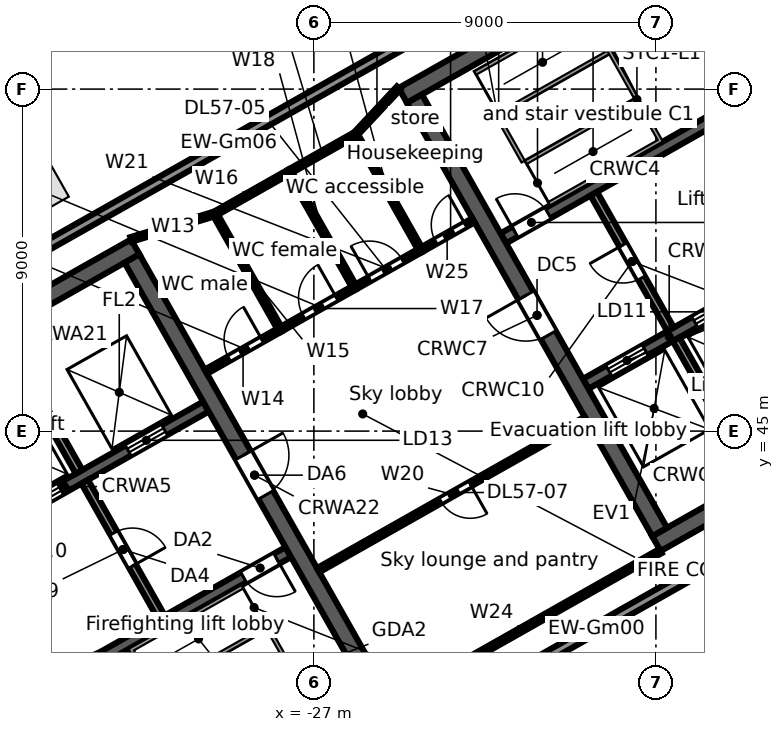
"""IFC4 building model, lengths in metres.
Left out: names, types, materials, properties, quantities, classifications, styles, units other than length and angle.
Written with IfcOpenShell. Run it as: python <this file> out.ifc"""

import sys

from ifc_helpers import new_model, si_unit, direction, frame, frame_2d, origin, origin_2d, place, context, subcontext, project, spatial, rectangle, extrude, element, fill, save


model = new_model("IFC4")
c1 = context("Model", 3, precision=1e-05, world=origin(), true_north=direction((0.0, 1.0)))
c2 = subcontext(c1, "Body", "Model", "MODEL_VIEW")
j1 = project(units=[si_unit("LENGTHUNIT", "METRE"), si_unit("PLANEANGLEUNIT", "RADIAN")], contexts=[c1])
p1 = place(None, origin())
s1 = spatial("IfcSite", under=j1, at=p1, CompositionType="ELEMENT")
p2 = place(p1, origin())
s2 = spatial("IfcBuilding", under=s1, at=p2, CompositionType="ELEMENT")
p3 = place(p2, frame((0.0, 0.0, 258.2)))
s3 = spatial("IfcBuildingStorey", under=s2, at=p3, CompositionType="ELEMENT", Elevation=258.2)
p4 = place(p3, frame((-34.334, 51.414, 0.0), z_axis=(0.0, 0.0, 1.0), x_axis=(-0.87035569594, -0.492423560103, 0.0)))
e1 = element("IfcColumn", 1, at=p4, inside=s3, PredefinedType="COLUMN", context=c2, shape_type="SweptSolid", body=[
    extrude(rectangle(XDim=1.3, YDim=1.3, at=origin_2d()), origin(), (0.0, 0.0, 1.0), 4.5),
])
p5 = place(p3, frame((-0.364, 50.666, 0.0), z_axis=(0.0, 0.0, 1.0), x_axis=(-0.870355021882, -0.492424751494, 0.0)))
e2 = element("IfcWall", 2, at=p5, inside=s3, PredefinedType="STANDARD", context=c2, shape_type="SweptSolid", body=[
    extrude(rectangle(XDim=44.126, YDim=0.25, at=frame_2d((22.063, 0.0))), origin(), (0.0, 0.0, 1.0), 3.12),
])
p6 = place(p3, frame((-56.251, 37.302, 0.0), z_axis=(0.0, 0.0, 1.0), x_axis=(0.87035543516, 0.49242402103, 0.0)))
e3 = element("IfcWall", 3, at=p6, inside=s3, PredefinedType="STANDARD", context=c2, shape_type="SweptSolid", body=[
    extrude(rectangle(XDim=62.067, YDim=0.25, at=frame_2d((31.033, 0.0))), origin(), (0.0, 0.0, 1.0), 3.512),
])
p7 = place(p3, frame((-34.245, 38.097, 0.0), z_axis=(0.0, 0.0, 1.0), x_axis=(0.870360409231, 0.492415229297, 0.0)))
e4 = element("IfcWall", 4, at=p7, inside=s3, PredefinedType="SOLIDWALL", context=c2, shape_type="SweptSolid", body=[
    extrude(rectangle(XDim=7.55, YDim=0.3, at=frame_2d((3.775, 0.0))), origin(), (0.0, 0.0, 1.0), 4.22),
])
p8 = place(p7, frame((6.2, 0.0, 0.0)))
e5 = element("IfcOpeningElement", 5, at=p8, cuts=e4, PredefinedType="OPENING", context=c2, shape_type="SweptSolid", body=[
    extrude(rectangle(XDim=1.0, YDim=2.1, at=frame_2d((0.5, 1.05))), frame((0.0, 0.16, 0.0), z_axis=(0.0, -1.0, 0.0), x_axis=(1.0, 0.0, 0.0)), (0.0, 0.0, 1.0), 0.32),
])
p9 = place(p3, frame((-37.282, 41.435, 0.0), z_axis=(0.0, 0.0, 1.0), x_axis=(0.870352688754, 0.492428875248, 0.0)))
e6 = element("IfcWall", 6, at=p9, inside=s3, PredefinedType="SOLIDWALL", context=c2, shape_type="SweptSolid", body=[
    extrude(rectangle(XDim=8.55, YDim=0.3, at=frame_2d((4.275, 0.0))), origin(), (0.0, 0.0, 1.0), 4.22),
])
p10 = place(p9, frame((0.65, 0.0, 0.0)))
e7 = element("IfcOpeningElement", 7, at=p10, cuts=e6, PredefinedType="OPENING", context=c2, shape_type="SweptSolid", body=[
    extrude(rectangle(XDim=1.1, YDim=2.1, at=frame_2d((0.55, 1.05))), frame((0.0, 0.16, 0.0), z_axis=(0.0, -1.0, 0.0), x_axis=(1.0, 0.0, 0.0)), (0.0, 0.0, 1.0), 0.32),
])
p11 = place(p9, frame((3.05, 0.0, 0.0)))
e8 = element("IfcOpeningElement", 8, at=p11, cuts=e6, PredefinedType="OPENING", context=c2, shape_type="SweptSolid", body=[
    extrude(rectangle(XDim=1.1, YDim=2.1, at=frame_2d((0.55, 1.05))), frame((0.0, 0.16, 0.0), z_axis=(0.0, -1.0, 0.0), x_axis=(1.0, 0.0, 0.0)), (0.0, 0.0, 1.0), 0.32),
])
p12 = place(p9, frame((6.2, 0.0, 0.0)))
e9 = element("IfcOpeningElement", 9, at=p12, cuts=e6, PredefinedType="OPENING", context=c2, shape_type="SweptSolid", body=[
    extrude(rectangle(XDim=1.1, YDim=2.1, at=frame_2d((0.55, 1.05))), frame((0.0, 0.16, 0.0), z_axis=(0.0, -1.0, 0.0), x_axis=(1.0, 0.0, 0.0)), (0.0, 0.0, 1.0), 0.32),
])
p13 = place(p3, frame((-46.498, 41.477, 0.0), z_axis=(0.0, 0.0, 1.0), x_axis=(0.870359753402, 0.492416388494, 0.0)))
e10 = element("IfcWall", 10, at=p13, inside=s3, PredefinedType="SOLIDWALL", context=c2, shape_type="SweptSolid", body=[
    extrude(rectangle(XDim=17.0, YDim=0.45, at=frame_2d((8.5, 0.0))), origin(), (0.0, 0.0, 1.0), 4.22),
])
p14 = place(p3, frame((-33.031, 43.667, 0.0), z_axis=(0.0, 0.0, 1.0), x_axis=(0.492408451753, -0.87036424366, 0.0)))
e11 = element("IfcWall", 11, at=p14, inside=s3, PredefinedType="PARTITIONING", context=c2, shape_type="SweptSolid", body=[
    extrude(rectangle(XDim=4.1, YDim=0.2, at=frame_2d((2.05, 0.0))), origin(), (0.0, 0.0, 1.0), 4.22),
])
p15 = place(p14, frame((1.55, 0.0, 0.0)))
e12 = element("IfcOpeningElement", 12, at=p15, cuts=e11, PredefinedType="OPENING", context=c2, shape_type="SweptSolid", body=[
    extrude(rectangle(XDim=1.0, YDim=2.1, at=frame_2d((0.5, 1.05))), frame((0.0, 0.11, 0.0), z_axis=(0.0, -1.0, 0.0), x_axis=(1.0, 0.0, 0.0)), (0.0, 0.0, 1.0), 0.22),
])
p16 = place(p3, frame((-35.246, 47.584, 0.0), z_axis=(0.0, 0.0, 1.0), x_axis=(0.492409653846, -0.870363563575, 0.0)))
e13 = element("IfcWall", 13, at=p16, inside=s3, PredefinedType="SOLIDWALL", context=c2, shape_type="SweptSolid", body=[
    extrude(rectangle(XDim=4.2, YDim=0.2, at=frame_2d((2.1, 0.0))), origin(), (0.0, 0.0, 1.0), 4.22),
])
p17 = place(p3, frame((-31.787, 49.542, 0.0), z_axis=(0.0, 0.0, 1.0), x_axis=(0.492421378713, -0.870356930107, 0.0)))
e14 = element("IfcWall", 14, at=p17, inside=s3, PredefinedType="SOLIDWALL", context=c2, shape_type="SweptSolid", body=[
    extrude(rectangle(XDim=13.1, YDim=0.45, at=frame_2d((6.55, 0.0))), origin(), (0.0, 0.0, 1.0), 4.22),
])
p18 = place(p17, frame((5.95, 0.0, 0.0)))
e15 = element("IfcOpeningElement", 15, at=p18, cuts=e14, PredefinedType="OPENING", context=c2, shape_type="SweptSolid", body=[
    extrude(rectangle(XDim=1.2, YDim=2.1, at=frame_2d((0.6, 1.05))), frame((0.0, 0.235, 0.0), z_axis=(0.0, -1.0, 0.0), x_axis=(1.0, 0.0, 0.0)), (0.0, 0.0, 1.0), 0.47),
])
p19 = place(p3, frame((-17.988, 42.039, 0.0), z_axis=(0.0, 0.0, 1.0), x_axis=(0.870360574057, 0.492414937962, 0.0)))
e16 = element("IfcWall", 16, at=p19, inside=s3, PredefinedType="SOLIDWALL", context=c2, shape_type="SweptSolid", body=[
    extrude(rectangle(XDim=15.0, YDim=0.45, at=frame_2d((7.5, 0.0))), origin(), (0.0, 0.0, 1.0), 4.22),
])
p20 = place(p19, frame((6.1, 0.0, 0.0)))
e17 = element("IfcOpeningElement", 17, at=p20, cuts=e16, PredefinedType="OPENING", context=c2, shape_type="SweptSolid", body=[
    extrude(rectangle(XDim=1.2, YDim=2.1, at=frame_2d((0.6, 1.05))), frame((0.0, 0.235, 0.0), z_axis=(0.0, -1.0, 0.0), x_axis=(1.0, 0.0, 0.0)), (0.0, 0.0, 1.0), 0.47),
])
p21 = place(p3, frame((-19.849, 46.242, 0.0), z_axis=(0.0, 0.0, 1.0), x_axis=(0.870347559728, 0.492437940532, 0.0)))
e18 = element("IfcWall", 18, at=p21, inside=s3, PredefinedType="SOLIDWALL", context=c2, shape_type="SweptSolid", body=[
    extrude(rectangle(XDim=5.05, YDim=0.3, at=frame_2d((2.525, 0.0))), origin(), (0.0, 0.0, 1.0), 4.22),
])
p22 = place(p21, frame((0.7, 0.0, 0.0)))
e19 = element("IfcOpeningElement", 19, at=p22, cuts=e18, PredefinedType="OPENING", context=c2, shape_type="SweptSolid", body=[
    extrude(rectangle(XDim=1.1, YDim=2.1, at=frame_2d((0.55, 1.05))), frame((0.0, 0.16, 0.0), z_axis=(0.0, -1.0, 0.0), x_axis=(1.0, 0.0, 0.0)), (0.0, 0.0, 1.0), 0.32),
])
p23 = place(p21, frame((3.3, 0.0, 0.0)))
e20 = element("IfcOpeningElement", 20, at=p23, cuts=e18, PredefinedType="OPENING", context=c2, shape_type="SweptSolid", body=[
    extrude(rectangle(XDim=1.1, YDim=2.1, at=frame_2d((0.55, 1.05))), frame((0.0, 0.16, 0.0), z_axis=(0.0, -1.0, 0.0), x_axis=(1.0, 0.0, 0.0)), (0.0, 0.0, 1.0), 0.32),
])
p24 = place(p3, frame((-22.015, 50.072, 0.0), z_axis=(0.0, 0.0, 1.0), x_axis=(0.870354900257, 0.492424966466, 0.0)))
e21 = element("IfcWall", 21, at=p24, inside=s3, PredefinedType="SOLIDWALL", context=c2, shape_type="SweptSolid", body=[
    extrude(rectangle(XDim=7.35, YDim=0.3, at=frame_2d((3.675, 0.0))), origin(), (0.0, 0.0, 1.0), 4.22),
])
p25 = place(p24, frame((0.35, 0.0, 0.0)))
e22 = element("IfcOpeningElement", 22, at=p25, cuts=e21, PredefinedType="OPENING", context=c2, shape_type="SweptSolid", body=[
    extrude(rectangle(XDim=1.0, YDim=2.1, at=frame_2d((0.5, 1.05))), frame((0.0, 0.16, 0.0), z_axis=(0.0, -1.0, 0.0), x_axis=(1.0, 0.0, 0.0)), (0.0, 0.0, 1.0), 0.32),
])
p26 = place(p3, frame((-24.66, 53.832, 0.0), z_axis=(0.0, 0.0, 1.0), x_axis=(0.870353598469, 0.492427267353, 0.0)))
e23 = element("IfcWall", 23, at=p26, inside=s3, PredefinedType="SOLIDWALL", context=c2, shape_type="SweptSolid", body=[
    extrude(rectangle(XDim=15.0, YDim=0.45, at=frame_2d((7.5, 0.0))), origin(), (0.0, 0.0, 1.0), 4.22),
])
p27 = place(p3, frame((-24.353, 53.747, 0.0), z_axis=(0.0, 0.0, 1.0), x_axis=(0.492435496286, -0.870348942665, 0.0)))
e24 = element("IfcWall", 24, at=p27, inside=s3, PredefinedType="SOLIDWALL", context=c2, shape_type="SweptSolid", body=[
    extrude(rectangle(XDim=13.1, YDim=0.45, at=frame_2d((6.55, 0.0))), origin(), (0.0, 0.0, 1.0), 4.22),
])
p28 = place(p27, frame((5.95, 0.0, 0.0)))
e25 = element("IfcOpeningElement", 25, at=p28, cuts=e24, PredefinedType="OPENING", context=c2, shape_type="SweptSolid", body=[
    extrude(rectangle(XDim=1.2, YDim=2.1, at=frame_2d((0.6, 1.05))), frame((0.0, 0.235, 0.0), z_axis=(0.0, -1.0, 0.0), x_axis=(1.0, 0.0, 0.0)), (0.0, 0.0, 1.0), 0.47),
])
p29 = place(p3, frame((-17.469, 47.417, 0.0), z_axis=(0.0, 0.0, 1.0), x_axis=(0.492453686477, -0.870338650569, 0.0)))
e26 = element("IfcWall", 26, at=p29, inside=s3, PredefinedType="SOLIDWALL", context=c2, shape_type="SweptSolid", body=[
    extrude(rectangle(XDim=4.2, YDim=0.2, at=frame_2d((2.1, 0.0))), origin(), (0.0, 0.0, 1.0), 4.22),
])
p30 = place(p3, frame((-19.635, 51.246, 0.0), z_axis=(0.0, 0.0, 1.0), x_axis=(0.492408451753, -0.87036424366, 0.0)))
e27 = element("IfcWall", 27, at=p30, inside=s3, PredefinedType="PARTITIONING", context=c2, shape_type="SweptSolid", body=[
    extrude(rectangle(XDim=4.1, YDim=0.2, at=frame_2d((2.05, 0.0))), origin(), (0.0, 0.0, 1.0), 4.22),
])
p31 = place(p30, frame((1.55, 0.0, 0.0)))
e28 = element("IfcOpeningElement", 28, at=p31, cuts=e27, PredefinedType="OPENING", context=c2, shape_type="SweptSolid", body=[
    extrude(rectangle(XDim=1.0, YDim=2.1, at=frame_2d((0.5, 1.05))), frame((0.0, 0.11, 0.0), z_axis=(0.0, -1.0, 0.0), x_axis=(1.0, 0.0, 0.0)), (0.0, 0.0, 1.0), 0.22),
])
p32 = place(p3, frame((-17.76, 57.477, 0.0), z_axis=(0.0, 0.0, 1.0), x_axis=(0.49243456751, -0.870349468157, 0.0)))
e29 = element("IfcWall", 29, at=p32, inside=s3, PredefinedType="SOLIDWALL", context=c2, shape_type="SweptSolid", body=[
    extrude(rectangle(XDim=4.2, YDim=0.3, at=frame_2d((2.1, 0.0))), origin(), (0.0, 0.0, 1.0), 4.22),
])
p33 = place(p3, frame((-31.812, 50.044, 0.0), z_axis=(0.0, 0.0, 1.0), x_axis=(0.956397612161, 0.292067813107, 0.0)))
e30 = element("IfcWall", 30, at=p33, inside=s3, PredefinedType="PARTITIONING", context=c2, shape_type="SweptSolid", body=[
    extrude(rectangle(XDim=2.305, YDim=0.125, at=frame_2d((1.152, 0.0))), origin(), (0.0, 0.0, 1.0), 4.22),
])
p34 = place(p3, frame((-29.843, 46.563, 0.0), z_axis=(0.0, 0.0, 1.0), x_axis=(0.870437546499, 0.492278861667, 0.0)))
e31 = element("IfcWall", 31, at=p34, inside=s3, PredefinedType="PARTITIONING", context=c2, shape_type="SweptSolid", body=[
    extrude(rectangle(XDim=2.25, YDim=0.125, at=frame_2d((1.125, 0.0))), origin(), (0.0, 0.0, 1.0), 4.22),
])
p35 = place(p34, frame((0.7, 0.0, 0.0)))
e32 = element("IfcOpeningElement", 32, at=p35, cuts=e31, PredefinedType="OPENING", context=c2, shape_type="SweptSolid", body=[
    extrude(rectangle(XDim=1.0, YDim=2.1, at=frame_2d((0.5, 1.05))), frame((0.0, 0.073, 0.0), z_axis=(0.0, -1.0, 0.0), x_axis=(1.0, 0.0, 0.0)), (0.0, 0.0, 1.0), 0.145),
])
p36 = place(p3, frame((-29.608, 50.717, 0.0), z_axis=(0.0, 0.0, 1.0), x_axis=(0.492521469645, -0.870300294116, 0.0)))
e33 = element("IfcWall", 33, at=p36, inside=s3, PredefinedType="PARTITIONING", context=c2, shape_type="SweptSolid", body=[
    extrude(rectangle(XDim=3.5, YDim=0.125, at=frame_2d((1.75, 0.0))), origin(), (0.0, 0.0, 1.0), 4.22),
])
p37 = place(p3, frame((-29.608, 50.717, 0.0), z_axis=(0.0, 0.0, 1.0), x_axis=(0.870332332106, 0.492464853254, 0.0)))
e34 = element("IfcWall", 34, at=p37, inside=s3, PredefinedType="PARTITIONING", context=c2, shape_type="SweptSolid", body=[
    extrude(rectangle(XDim=2.25, YDim=0.125, at=frame_2d((1.125, 0.0))), origin(), (0.0, 0.0, 1.0), 4.22),
])
p38 = place(p3, frame((-27.884, 47.671, 0.0), z_axis=(0.0, 0.0, 1.0), x_axis=(0.870285818058, 0.4925470484, 0.0)))
e35 = element("IfcWall", 35, at=p38, inside=s3, PredefinedType="PARTITIONING", context=c2, shape_type="SweptSolid", body=[
    extrude(rectangle(XDim=2.25, YDim=0.125, at=frame_2d((1.125, 0.0))), origin(), (0.0, 0.0, 1.0), 4.22),
])
p39 = place(p38, frame((0.7, 0.0, 0.0)))
e36 = element("IfcOpeningElement", 36, at=p39, cuts=e35, PredefinedType="OPENING", context=c2, shape_type="SweptSolid", body=[
    extrude(rectangle(XDim=1.0, YDim=2.1, at=frame_2d((0.5, 1.05))), frame((0.0, 0.073, 0.0), z_axis=(0.0, -1.0, 0.0), x_axis=(1.0, 0.0, 0.0)), (0.0, 0.0, 1.0), 0.145),
])
p40 = place(p3, frame((-27.65, 51.825, 0.0), z_axis=(0.0, 0.0, 1.0), x_axis=(0.492551369934, -0.870283372228, 0.0)))
e37 = element("IfcWall", 37, at=p40, inside=s3, PredefinedType="PARTITIONING", context=c2, shape_type="SweptSolid", body=[
    extrude(rectangle(XDim=3.5, YDim=0.125, at=frame_2d((1.75, 0.0))), origin(), (0.0, 0.0, 1.0), 4.22),
])
p41 = place(p3, frame((-27.65, 51.825, 0.0), z_axis=(0.0, 0.0, 1.0), x_axis=(0.870330884088, 0.492467412326, 0.0)))
e38 = element("IfcWall", 38, at=p41, inside=s3, PredefinedType="PARTITIONING", context=c2, shape_type="SweptSolid", body=[
    extrude(rectangle(XDim=2.0, YDim=0.125, at=frame_2d((1.0, 0.0))), origin(), (0.0, 0.0, 1.0), 4.22),
])
p42 = place(p3, frame((-26.888, 41.34, 0.0), z_axis=(0.0, 0.0, 1.0), x_axis=(0.870318838095, 0.492488700436, 0.0)))
e39 = element("IfcWall", 39, at=p42, inside=s3, PredefinedType="PARTITIONING", context=c2, shape_type="SweptSolid", body=[
    extrude(rectangle(XDim=8.091, YDim=0.125, at=frame_2d((4.046, 0.0))), origin(), (0.0, 0.0, 1.0), 3.492),
])
p43 = place(p42, frame((3.7, 0.0, 0.0)))
e40 = element("IfcOpeningElement", 40, at=p43, cuts=e39, PredefinedType="OPENING", context=c2, shape_type="SweptSolid", body=[
    extrude(rectangle(XDim=0.9, YDim=2.1, at=frame_2d((0.45, 1.05))), frame((0.0, 0.073, 0.0), z_axis=(0.0, -1.0, 0.0), x_axis=(1.0, 0.0, 0.0)), (0.0, 0.0, 1.0), 0.145),
])
p44 = place(p3, frame((-25.926, 48.779, 0.0), z_axis=(0.0, 0.0, 1.0), x_axis=(0.870474108635, 0.492214207633, 0.0)))
e41 = element("IfcWall", 41, at=p44, inside=s3, PredefinedType="PARTITIONING", context=c2, shape_type="SweptSolid", body=[
    extrude(rectangle(XDim=1.999, YDim=0.125, at=frame_2d((1.0, 0.0))), origin(), (0.0, 0.0, 1.0), 4.22),
])
p45 = place(p44, frame((0.45, 0.0, 0.0)))
e42 = element("IfcOpeningElement", 42, at=p45, cuts=e41, PredefinedType="OPENING", context=c2, shape_type="SweptSolid", body=[
    extrude(rectangle(XDim=1.0, YDim=2.1, at=frame_2d((0.5, 1.05))), frame((0.0, 0.073, 0.0), z_axis=(0.0, -1.0, 0.0), x_axis=(1.0, 0.0, 0.0)), (0.0, 0.0, 1.0), 0.145),
])
p46 = place(p3, frame((-25.909, 52.81, 0.0), z_axis=(0.0, 0.0, 1.0), x_axis=(0.682678244456, 0.730719107829, 0.0)))
e43 = element("IfcWall", 43, at=p46, inside=s3, PredefinedType="PARTITIONING", context=c2, shape_type="SweptSolid", body=[
    extrude(rectangle(XDim=1.667, YDim=0.125, at=frame_2d((0.833, 0.0))), origin(), (0.0, 0.0, 1.0), 3.492),
])
p47 = place(p3, frame((-25.909, 52.81, 0.0), z_axis=(0.0, 0.0, 1.0), x_axis=(0.492190545807, -0.870487487916, 0.0)))
e44 = element("IfcWall", 44, at=p47, inside=s3, PredefinedType="PARTITIONING", context=c2, shape_type="SweptSolid", body=[
    extrude(rectangle(XDim=3.5, YDim=0.125, at=frame_2d((1.75, 0.0))), origin(), (0.0, 0.0, 1.0), 4.22),
])
p48 = place(p3, frame((-24.919, 37.859, 0.0), z_axis=(0.0, 0.0, 1.0), x_axis=(0.870357635969, 0.492420131098, 0.0)))
e45 = element("IfcWall", 45, at=p48, inside=s3, PredefinedType="PARTITIONING", context=c2, shape_type="SweptSolid", body=[
    extrude(rectangle(XDim=8.091, YDim=0.125, at=frame_2d((4.045, 0.0))), origin(), (0.0, 0.0, 1.0), 3.492),
])
p49 = place(p3, frame((-24.186, 49.763, 0.0), z_axis=(0.0, 0.0, 1.0), x_axis=(0.870199776528, 0.492699044986, 0.0)))
e46 = element("IfcWall", 46, at=p49, inside=s3, PredefinedType="PARTITIONING", context=c2, shape_type="SweptSolid", body=[
    extrude(rectangle(XDim=1.592, YDim=0.125, at=frame_2d((0.796, 0.0))), origin(), (0.0, 0.0, 1.0), 3.492),
])
p50 = place(p49, frame((0.45, 0.0, 0.0)))
e47 = element("IfcOpeningElement", 47, at=p50, cuts=e46, PredefinedType="OPENING", context=c2, shape_type="SweptSolid", body=[
    extrude(rectangle(XDim=0.9, YDim=2.1, at=frame_2d((0.45, 1.05))), frame((0.0, 0.073, 0.0), z_axis=(0.0, -1.0, 0.0), x_axis=(1.0, 0.0, 0.0)), (0.0, 0.0, 1.0), 0.145),
])
p51 = place(p11, origin())
e48 = element("IfcDoor", 48, at=p51, inside=s3, OperationType="DOUBLE_DOOR_SLIDING", PredefinedType="DOOR", context=c2, shape_type="SweptSolid", body=[
    extrude(rectangle(XDim=1.1, YDim=2.1, at=frame_2d((0.55, 1.05))), frame((0.0, 0.025, 0.0), z_axis=(0.0, -1.0, 0.0), x_axis=(1.0, 0.0, 0.0)), (0.0, 0.0, 1.0), 0.05),
])
fill(e8, e48)
p52 = place(p12, origin())
e49 = element("IfcDoor", 49, at=p52, inside=s3, OperationType="DOUBLE_DOOR_SLIDING", PredefinedType="DOOR", context=c2, shape_type="SweptSolid", body=[
    extrude(rectangle(XDim=1.1, YDim=2.1, at=frame_2d((0.55, 1.05))), frame((0.0, 0.025, 0.0), z_axis=(0.0, -1.0, 0.0), x_axis=(1.0, 0.0, 0.0)), (0.0, 0.0, 1.0), 0.05),
])
fill(e9, e49)
p53 = place(p8, frame((1.0, 0.0, 0.0), z_axis=(0.0, 0.0, 1.0), x_axis=(-1.0, 0.0, 0.0)))
e50 = element("IfcDoor", 50, at=p53, inside=s3, OperationType="SINGLE_SWING_LEFT", PredefinedType="DOOR", context=c2, shape_type="SweptSolid", body=[
    extrude(rectangle(XDim=1.0, YDim=2.1, at=frame_2d((0.5, 1.05))), frame((0.0, 0.025, 0.0), z_axis=(0.0, -1.0, 0.0), x_axis=(1.0, 0.0, 0.0)), (0.0, 0.0, 1.0), 0.05),
])
fill(e5, e50)
p54 = place(p15, origin())
e51 = element("IfcDoor", 51, at=p54, inside=s3, OperationType="SINGLE_SWING_RIGHT", PredefinedType="DOOR", context=c2, shape_type="SweptSolid", body=[
    extrude(rectangle(XDim=1.0, YDim=2.1, at=frame_2d((0.5, 1.05))), frame((0.0, 0.025, 0.0), z_axis=(0.0, -1.0, 0.0), x_axis=(1.0, 0.0, 0.0)), (0.0, 0.0, 1.0), 0.05),
])
fill(e12, e51)
p55 = place(p18, origin())
e52 = element("IfcDoor", 52, at=p55, inside=s3, OperationType="SINGLE_SWING_LEFT", PredefinedType="DOOR", context=c2, shape_type="SweptSolid", body=[
    extrude(rectangle(XDim=1.2, YDim=2.1, at=frame_2d((0.6, 1.05))), frame((0.0, 0.025, 0.0), z_axis=(0.0, -1.0, 0.0), x_axis=(1.0, 0.0, 0.0)), (0.0, 0.0, 1.0), 0.05),
])
fill(e15, e52)
p56 = place(p22, origin())
e53 = element("IfcDoor", 53, at=p56, inside=s3, OperationType="DOUBLE_DOOR_SLIDING", PredefinedType="DOOR", context=c2, shape_type="SweptSolid", body=[
    extrude(rectangle(XDim=1.1, YDim=2.1, at=frame_2d((0.55, 1.05))), frame((0.0, 0.025, 0.0), z_axis=(0.0, -1.0, 0.0), x_axis=(1.0, 0.0, 0.0)), (0.0, 0.0, 1.0), 0.05),
])
fill(e19, e53)
p57 = place(p23, origin())
e54 = element("IfcDoor", 54, at=p57, inside=s3, OperationType="DOUBLE_DOOR_SLIDING", PredefinedType="DOOR", context=c2, shape_type="SweptSolid", body=[
    extrude(rectangle(XDim=1.1, YDim=2.1, at=frame_2d((0.55, 1.05))), frame((0.0, 0.025, 0.0), z_axis=(0.0, -1.0, 0.0), x_axis=(1.0, 0.0, 0.0)), (0.0, 0.0, 1.0), 0.05),
])
fill(e20, e54)
p58 = place(p25, origin())
e55 = element("IfcDoor", 55, at=p58, inside=s3, OperationType="SINGLE_SWING_LEFT", PredefinedType="DOOR", context=c2, shape_type="SweptSolid", body=[
    extrude(rectangle(XDim=1.0, YDim=2.1, at=frame_2d((0.5, 1.05))), frame((0.0, 0.025, 0.0), z_axis=(0.0, -1.0, 0.0), x_axis=(1.0, 0.0, 0.0)), (0.0, 0.0, 1.0), 0.05),
])
fill(e22, e55)
p59 = place(p31, frame((1.0, 0.0, 0.0), z_axis=(0.0, 0.0, 1.0), x_axis=(-1.0, 0.0, 0.0)))
e56 = element("IfcDoor", 56, at=p59, inside=s3, OperationType="SINGLE_SWING_RIGHT", PredefinedType="DOOR", context=c2, shape_type="SweptSolid", body=[
    extrude(rectangle(XDim=1.0, YDim=2.1, at=frame_2d((0.5, 1.05))), frame((0.0, 0.025, 0.0), z_axis=(0.0, -1.0, 0.0), x_axis=(1.0, 0.0, 0.0)), (0.0, 0.0, 1.0), 0.05),
])
fill(e28, e56)
p60 = place(p28, frame((1.2, 0.0, 0.0), z_axis=(0.0, 0.0, 1.0), x_axis=(-1.0, 0.0, 0.0)))
e57 = element("IfcDoor", 57, at=p60, inside=s3, OperationType="SINGLE_SWING_RIGHT", PredefinedType="DOOR", context=c2, shape_type="SweptSolid", body=[
    extrude(rectangle(XDim=1.2, YDim=2.1, at=frame_2d((0.6, 1.05))), frame((0.0, 0.025, 0.0), z_axis=(0.0, -1.0, 0.0), x_axis=(1.0, 0.0, 0.0)), (0.0, 0.0, 1.0), 0.05),
])
fill(e25, e57)
p61 = place(p35, origin())
e58 = element("IfcDoor", 58, at=p61, inside=s3, OperationType="SINGLE_SWING_RIGHT", PredefinedType="DOOR", context=c2, shape_type="SweptSolid", body=[
    extrude(rectangle(XDim=1.0, YDim=2.1, at=frame_2d((0.5, 1.05))), frame((0.0, 0.025, 0.0), z_axis=(0.0, -1.0, 0.0), x_axis=(1.0, 0.0, 0.0)), (0.0, 0.0, 1.0), 0.05),
])
fill(e32, e58)
p62 = place(p39, origin())
e59 = element("IfcDoor", 59, at=p62, inside=s3, OperationType="SINGLE_SWING_RIGHT", PredefinedType="DOOR", context=c2, shape_type="SweptSolid", body=[
    extrude(rectangle(XDim=1.0, YDim=2.1, at=frame_2d((0.5, 1.05))), frame((0.0, 0.025, 0.0), z_axis=(0.0, -1.0, 0.0), x_axis=(1.0, 0.0, 0.0)), (0.0, 0.0, 1.0), 0.05),
])
fill(e36, e59)
p63 = place(p45, origin())
e60 = element("IfcDoor", 60, at=p63, inside=s3, OperationType="SINGLE_SWING_LEFT", PredefinedType="DOOR", context=c2, shape_type="SweptSolid", body=[
    extrude(rectangle(XDim=1.0, YDim=2.1, at=frame_2d((0.5, 1.05))), frame((0.0, 0.025, 0.0), z_axis=(0.0, -1.0, 0.0), x_axis=(1.0, 0.0, 0.0)), (0.0, 0.0, 1.0), 0.05),
])
fill(e42, e60)
p64 = place(p50, origin())
e61 = element("IfcDoor", 61, at=p64, inside=s3, OperationType="SINGLE_SWING_RIGHT", PredefinedType="DOOR", context=c2, shape_type="SweptSolid", body=[
    extrude(rectangle(XDim=0.9, YDim=2.1, at=frame_2d((0.45, 1.05))), frame((0.0, 0.025, 0.0), z_axis=(0.0, -1.0, 0.0), x_axis=(1.0, 0.0, 0.0)), (0.0, 0.0, 1.0), 0.05),
])
fill(e47, e61)
p65 = place(p43, frame((0.9, 0.0, 0.0), z_axis=(0.0, 0.0, 1.0), x_axis=(-1.0, 0.0, 0.0)))
e62 = element("IfcDoor", 62, at=p65, inside=s3, OperationType="SINGLE_SWING_LEFT", PredefinedType="DOOR", context=c2, shape_type="SweptSolid", body=[
    extrude(rectangle(XDim=0.9, YDim=2.1, at=frame_2d((0.45, 1.05))), frame((0.0, 0.025, 0.0), z_axis=(0.0, -1.0, 0.0), x_axis=(1.0, 0.0, 0.0)), (0.0, 0.0, 1.0), 0.05),
])
fill(e40, e62)
save(model, sys.argv[1])
